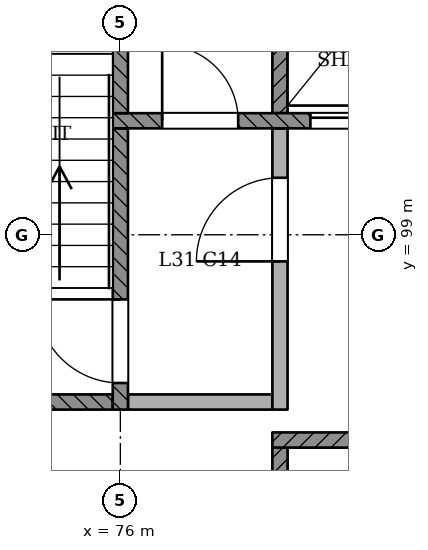
"""IFC4 building model, lengths in metres.
Left out: names, types, materials, properties, quantities, classifications, styles, units other than length and angle.
Written with IfcOpenShell. Run it as: python <this file> out.ifc"""

import sys

from ifc_helpers import new_model, si_unit, direction, frame, frame_2d, origin, place, context, subcontext, project, spatial, rectangle, extrude, element, fill, save


model = new_model("IFC4")
c1 = context("Model", 3, precision=1e-05, world=origin(), true_north=direction((0.0, 1.0)))
c2 = subcontext(c1, "Body", "Model", "MODEL_VIEW")
j1 = project(units=[si_unit("LENGTHUNIT", "METRE"), si_unit("PLANEANGLEUNIT", "RADIAN")], contexts=[c1])
p1 = place(None, origin())
s1 = spatial("IfcSite", under=j1, at=p1, CompositionType="ELEMENT")
p2 = place(p1, origin())
s2 = spatial("IfcBuilding", under=s1, at=p2, CompositionType="ELEMENT")
p3 = place(p2, frame((0.0, 0.0, 124.2)))
s3 = spatial("IfcBuildingStorey", under=s2, at=p3, CompositionType="ELEMENT", Elevation=124.2)
p4 = place(p3, frame((64.413, 98.139, 0.0), z_axis=(0.0, 0.0, 1.0), x_axis=(0.500003831119, -0.866023191876, 0.0)))
e1 = element("IfcWall", 1, at=p4, inside=s3, PredefinedType="PARTITIONING", context=c2, shape_type="SweptSolid", body=[
    extrude(rectangle(XDim=40.758, YDim=0.15, at=frame_2d((20.379, 0.0))), origin(), (0.0, 0.0, 1.0), 2.75),
])
p5 = place(p4, frame((0.2, 0.0, 0.0)))
e2 = element("IfcOpeningElement", 2, at=p5, cuts=e1, PredefinedType="OPENING", context=c2, shape_type="SweptSolid", body=[
    extrude(rectangle(XDim=1.2, YDim=2.1, at=frame_2d((0.6, 1.05))), frame((0.0, 0.085, 0.0), z_axis=(0.0, -1.0, 0.0), x_axis=(1.0, 0.0, 0.0)), (0.0, 0.0, 1.0), 0.171),
])
p6 = place(p4, frame((3.099, 0.0, 0.0)))
e3 = element("IfcOpeningElement", 3, at=p6, cuts=e1, PredefinedType="OPENING", context=c2, shape_type="SweptSolid", body=[
    extrude(rectangle(XDim=1.0, YDim=2.1, at=frame_2d((0.5, 1.05))), frame((0.0, 0.085, 0.0), z_axis=(0.0, -1.0, 0.0), x_axis=(1.0, 0.0, 0.0)), (0.0, 0.0, 1.0), 0.171),
])
p7 = place(p4, frame((9.774, 0.0, 0.0)))
e4 = element("IfcOpeningElement", 4, at=p7, cuts=e1, PredefinedType="OPENING", context=c2, shape_type="SweptSolid", body=[
    extrude(rectangle(XDim=1.0, YDim=2.1, at=frame_2d((0.5, 1.05))), frame((0.0, 0.085, 0.0), z_axis=(0.0, -1.0, 0.0), x_axis=(1.0, 0.0, 0.0)), (0.0, 0.0, 1.0), 0.171),
])
p8 = place(p4, frame((11.984, 0.0, 0.0)))
e5 = element("IfcOpeningElement", 5, at=p8, cuts=e1, PredefinedType="OPENING", context=c2, shape_type="SweptSolid", body=[
    extrude(rectangle(XDim=1.0, YDim=2.1, at=frame_2d((0.5, 1.05))), frame((0.0, 0.085, 0.0), z_axis=(0.0, -1.0, 0.0), x_axis=(1.0, 0.0, 0.0)), (0.0, 0.0, 1.0), 0.171),
])
p9 = place(p4, frame((18.659, 0.0, 0.0)))
e6 = element("IfcOpeningElement", 6, at=p9, cuts=e1, PredefinedType="OPENING", context=c2, shape_type="SweptSolid", body=[
    extrude(rectangle(XDim=1.0, YDim=2.1, at=frame_2d((0.5, 1.05))), frame((0.0, 0.085, 0.0), z_axis=(0.0, -1.0, 0.0), x_axis=(1.0, 0.0, 0.0)), (0.0, 0.0, 1.0), 0.171),
])
p10 = place(p4, frame((22.129, 0.0, 0.0)))
e7 = element("IfcOpeningElement", 7, at=p10, cuts=e1, PredefinedType="OPENING", context=c2, shape_type="SweptSolid", body=[
    extrude(rectangle(XDim=1.0, YDim=2.1, at=frame_2d((0.5, 1.05))), frame((0.0, 0.085, 0.0), z_axis=(0.0, -1.0, 0.0), x_axis=(1.0, 0.0, 0.0)), (0.0, 0.0, 1.0), 0.171),
])
p11 = place(p4, frame((27.659, 0.0, 0.0)))
e8 = element("IfcOpeningElement", 8, at=p11, cuts=e1, PredefinedType="OPENING", context=c2, shape_type="SweptSolid", body=[
    extrude(rectangle(XDim=1.0, YDim=2.1, at=frame_2d((0.5, 1.05))), frame((0.0, 0.085, 0.0), z_axis=(0.0, -1.0, 0.0), x_axis=(1.0, 0.0, 0.0)), (0.0, 0.0, 1.0), 0.171),
])
p12 = place(p4, frame((31.129, 0.0, 0.0)))
e9 = element("IfcOpeningElement", 9, at=p12, cuts=e1, PredefinedType="OPENING", context=c2, shape_type="SweptSolid", body=[
    extrude(rectangle(XDim=1.0, YDim=2.1, at=frame_2d((0.5, 1.05))), frame((0.0, 0.085, 0.0), z_axis=(0.0, -1.0, 0.0), x_axis=(1.0, 0.0, 0.0)), (0.0, 0.0, 1.0), 0.171),
])
p13 = place(p4, frame((36.659, 0.0, 0.0)))
e10 = element("IfcOpeningElement", 10, at=p13, cuts=e1, PredefinedType="OPENING", context=c2, shape_type="SweptSolid", body=[
    extrude(rectangle(XDim=1.0, YDim=2.1, at=frame_2d((0.5, 1.05))), frame((0.0, 0.085, 0.0), z_axis=(0.0, -1.0, 0.0), x_axis=(1.0, 0.0, 0.0)), (0.0, 0.0, 1.0), 0.171),
])
p14 = place(p4, frame((39.445, 0.0, 0.0)))
e11 = element("IfcOpeningElement", 11, at=p14, cuts=e1, PredefinedType="OPENING", context=c2, shape_type="SweptSolid", body=[
    extrude(rectangle(XDim=1.0, YDim=2.1, at=frame_2d((0.5, 1.05))), frame((0.0, 0.085, 0.0), z_axis=(0.0, -1.0, 0.0), x_axis=(1.0, 0.0, 0.0)), (0.0, 0.0, 1.0), 0.171),
])
p15 = place(p3, frame((78.1, 93.4, 0.0), z_axis=(0.0, 0.0, 1.0), x_axis=(0.0, 1.0, 0.0)))
e12 = element("IfcWall", 12, at=p15, inside=s3, PredefinedType="SOLIDWALL", context=c2, shape_type="SweptSolid", body=[
    extrude(rectangle(XDim=2.8, YDim=0.2, at=frame_2d((1.4, 0.0))), origin(), (0.0, 0.0, 1.0), 3.15),
])
p16 = place(p3, frame((78.0, 96.3, 0.0), z_axis=(0.0, 0.0, 1.0), x_axis=(1.0, 0.0, 0.0)))
e13 = element("IfcWall", 13, at=p16, inside=s3, PredefinedType="SOLIDWALL", context=c2, shape_type="SweptSolid", body=[
    extrude(rectangle(XDim=7.8, YDim=0.2, at=frame_2d((3.9, 0.0))), origin(), (0.0, 0.0, 1.0), 3.15),
])
p17 = place(p3, frame((73.0, 96.8, 0.0), z_axis=(0.0, 0.0, 1.0), x_axis=(1.0, 0.0, 0.0)))
e14 = element("IfcWall", 14, at=p17, inside=s3, PredefinedType="SOLIDWALL", context=c2, shape_type="SweptSolid", body=[
    extrude(rectangle(XDim=2.9, YDim=0.2, at=frame_2d((1.45, 0.0))), origin(), (0.0, 0.0, 1.0), 3.15),
])
p18 = place(p3, frame((76.0, 96.7, 0.0), z_axis=(0.0, 0.0, 1.0), x_axis=(0.0, 1.0, 0.0)))
e15 = element("IfcWall", 15, at=p18, inside=s3, PredefinedType="SOLIDWALL", context=c2, shape_type="SweptSolid", body=[
    extrude(rectangle(XDim=3.7, YDim=0.2, at=frame_2d((1.85, 0.0))), origin(), (0.0, 0.0, 1.0), 3.15),
])
p19 = place(p18, frame((0.35, 0.0, 0.0)))
e16 = element("IfcOpeningElement", 16, at=p19, cuts=e15, PredefinedType="OPENING", context=c2, shape_type="SweptSolid", body=[
    extrude(rectangle(XDim=1.1, YDim=2.1, at=frame_2d((0.55, 1.05))), frame((0.0, 0.11, 0.0), z_axis=(0.0, -1.0, 0.0), x_axis=(1.0, 0.0, 0.0)), (0.0, 0.0, 1.0), 0.221),
])
p20 = place(p3, frame((76.1, 96.8, 0.0), z_axis=(0.0, 0.0, 1.0), x_axis=(1.0, 0.0, 0.0)))
e17 = element("IfcWall", 17, at=p20, inside=s3, PredefinedType="PARTITIONING", context=c2, shape_type="SweptSolid", body=[
    extrude(rectangle(XDim=1.9, YDim=0.2, at=frame_2d((0.95, 0.0))), origin(), (0.0, 0.0, 1.0), 3.15),
])
p21 = place(p3, frame((78.1, 96.7, 0.0), z_axis=(0.0, 0.0, 1.0), x_axis=(0.0, 1.0, 0.0)))
e18 = element("IfcWall", 18, at=p21, inside=s3, PredefinedType="PARTITIONING", context=c2, shape_type="SweptSolid", body=[
    extrude(rectangle(XDim=3.7, YDim=0.2, at=frame_2d((1.85, 0.0))), origin(), (0.0, 0.0, 1.0), 3.15),
])
p22 = place(p21, frame((1.95, 0.0, 0.0)))
e19 = element("IfcOpeningElement", 19, at=p22, cuts=e18, PredefinedType="OPENING", context=c2, shape_type="SweptSolid", body=[
    extrude(rectangle(XDim=1.1, YDim=2.1, at=frame_2d((0.55, 1.05))), frame((0.0, 0.11, 0.0), z_axis=(0.0, -1.0, 0.0), x_axis=(1.0, 0.0, 0.0)), (0.0, 0.0, 1.0), 0.221),
])
p23 = place(p3, frame((75.9, 100.5, 0.0), z_axis=(0.0, 0.0, 1.0), x_axis=(1.0, 0.0, 0.0)))
e20 = element("IfcWall", 20, at=p23, inside=s3, PredefinedType="SOLIDWALL", context=c2, shape_type="SweptSolid", body=[
    extrude(rectangle(XDim=18.2, YDim=0.2, at=frame_2d((9.1, 0.0))), origin(), (0.0, 0.0, 1.0), 3.15),
])
p24 = place(p23, frame((2.6, 0.0, 0.0)))
e21 = element("IfcOpeningElement", 21, at=p24, cuts=e20, PredefinedType="OPENING", context=c2, shape_type="SweptSolid", body=[
    extrude(rectangle(XDim=1.1, YDim=2.1, at=frame_2d((0.55, 1.05))), frame((0.0, 0.11, 0.0), z_axis=(0.0, -1.0, 0.0), x_axis=(1.0, 0.0, 0.0)), (0.0, 0.0, 1.0), 0.221),
])
p25 = place(p23, frame((4.5, 0.0, 0.0)))
e22 = element("IfcOpeningElement", 22, at=p25, cuts=e20, PredefinedType="OPENING", context=c2, shape_type="SweptSolid", body=[
    extrude(rectangle(XDim=1.1, YDim=2.1, at=frame_2d((0.55, 1.05))), frame((0.0, 0.11, 0.0), z_axis=(0.0, -1.0, 0.0), x_axis=(1.0, 0.0, 0.0)), (0.0, 0.0, 1.0), 0.221),
])
p26 = place(p23, frame((6.4, 0.0, 0.0)))
e23 = element("IfcOpeningElement", 23, at=p26, cuts=e20, PredefinedType="OPENING", context=c2, shape_type="SweptSolid", body=[
    extrude(rectangle(XDim=1.1, YDim=2.1, at=frame_2d((0.55, 1.05))), frame((0.0, 0.11, 0.0), z_axis=(0.0, -1.0, 0.0), x_axis=(1.0, 0.0, 0.0)), (0.0, 0.0, 1.0), 0.221),
])
p27 = place(p23, frame((8.3, 0.0, 0.0)))
e24 = element("IfcOpeningElement", 24, at=p27, cuts=e20, PredefinedType="OPENING", context=c2, shape_type="SweptSolid", body=[
    extrude(rectangle(XDim=1.1, YDim=2.1, at=frame_2d((0.55, 1.05))), frame((0.0, 0.11, 0.0), z_axis=(0.0, -1.0, 0.0), x_axis=(1.0, 0.0, 0.0)), (0.0, 0.0, 1.0), 0.221),
])
p28 = place(p23, frame((10.2, 0.0, 0.0)))
e25 = element("IfcOpeningElement", 25, at=p28, cuts=e20, PredefinedType="OPENING", context=c2, shape_type="SweptSolid", body=[
    extrude(rectangle(XDim=1.1, YDim=2.1, at=frame_2d((0.55, 1.05))), frame((0.0, 0.11, 0.0), z_axis=(0.0, -1.0, 0.0), x_axis=(1.0, 0.0, 0.0)), (0.0, 0.0, 1.0), 0.221),
])
p29 = place(p23, frame((12.1, 0.0, 0.0)))
e26 = element("IfcOpeningElement", 26, at=p29, cuts=e20, PredefinedType="OPENING", context=c2, shape_type="SweptSolid", body=[
    extrude(rectangle(XDim=1.1, YDim=2.1, at=frame_2d((0.55, 1.05))), frame((0.0, 0.11, 0.0), z_axis=(0.0, -1.0, 0.0), x_axis=(1.0, 0.0, 0.0)), (0.0, 0.0, 1.0), 0.221),
])
p30 = place(p23, frame((14.0, 0.0, 0.0)))
e27 = element("IfcOpeningElement", 27, at=p30, cuts=e20, PredefinedType="OPENING", context=c2, shape_type="SweptSolid", body=[
    extrude(rectangle(XDim=1.1, YDim=2.1, at=frame_2d((0.55, 1.05))), frame((0.0, 0.11, 0.0), z_axis=(0.0, -1.0, 0.0), x_axis=(1.0, 0.0, 0.0)), (0.0, 0.0, 1.0), 0.221),
])
p31 = place(p23, frame((0.65, 0.0, 0.0)))
e28 = element("IfcOpeningElement", 28, at=p31, cuts=e20, PredefinedType="OPENING", context=c2, shape_type="SweptSolid", body=[
    extrude(rectangle(XDim=1.0, YDim=2.1, at=frame_2d((0.5, 1.05))), frame((0.0, 0.11, 0.0), z_axis=(0.0, -1.0, 0.0), x_axis=(1.0, 0.0, 0.0)), (0.0, 0.0, 1.0), 0.221),
])
p32 = place(p23, frame((16.3, 0.0, 0.0)))
e29 = element("IfcOpeningElement", 29, at=p32, cuts=e20, PredefinedType="OPENING", context=c2, shape_type="SweptSolid", body=[
    extrude(rectangle(XDim=1.0, YDim=2.1, at=frame_2d((0.5, 1.05))), frame((0.0, 0.11, 0.0), z_axis=(0.0, -1.0, 0.0), x_axis=(1.0, 0.0, 0.0)), (0.0, 0.0, 1.0), 0.221),
])
for number, where, z_axis, x_axis in (
    (30, (76.0, 100.6, 0.0), (0.0, 0.0, 1.0), (0.0, 1.0, 0.0)),
    (31, (78.1, 100.6, 0.0), (0.0, 0.0, 1.0), (0.0, 1.0, 0.0)),
):
    element("IfcWall", number, at=place(p3, frame(where, z_axis=z_axis, x_axis=x_axis)), inside=s3, PredefinedType="SOLIDWALL", context=c2, shape_type="SweptSolid", body=[
        extrude(rectangle(XDim=2.8, YDim=0.2, at=frame_2d((1.4, 0.0))), origin(), (0.0, 0.0, 1.0), 3.15),
    ])
p33 = place(p24, origin())
e32 = element("IfcDoor", 32, at=p33, inside=s3, OperationType="SLIDING_TO_RIGHT", PredefinedType="NOTDEFINED", context=c2, shape_type="SweptSolid", body=[
    extrude(rectangle(XDim=1.1, YDim=2.1, at=frame_2d((0.55, 1.05))), frame((0.0, 0.025, 0.0), z_axis=(0.0, -1.0, 0.0), x_axis=(1.0, 0.0, 0.0)), (0.0, 0.0, 1.0), 0.05),
])
fill(e21, e32)
p34 = place(p19, origin())
e33 = element("IfcDoor", 33, at=p34, inside=s3, OperationType="SINGLE_SWING_RIGHT", PredefinedType="NOTDEFINED", context=c2, shape_type="SweptSolid", body=[
    extrude(rectangle(XDim=1.1, YDim=2.1, at=frame_2d((0.55, 1.05))), frame((0.0, 0.025, 0.0), z_axis=(0.0, -1.0, 0.0), x_axis=(1.0, 0.0, 0.0)), (0.0, 0.0, 1.0), 0.05),
])
fill(e16, e33)
p35 = place(p22, origin())
e34 = element("IfcDoor", 34, at=p35, inside=s3, OperationType="SINGLE_SWING_LEFT", PredefinedType="NOTDEFINED", context=c2, shape_type="SweptSolid", body=[
    extrude(rectangle(XDim=1.1, YDim=2.1, at=frame_2d((0.55, 1.05))), frame((0.0, 0.025, 0.0), z_axis=(0.0, -1.0, 0.0), x_axis=(1.0, 0.0, 0.0)), (0.0, 0.0, 1.0), 0.05),
])
fill(e19, e34)
p36 = place(p31, origin())
e35 = element("IfcDoor", 35, at=p36, inside=s3, OperationType="SINGLE_SWING_LEFT", PredefinedType="NOTDEFINED", context=c2, shape_type="SweptSolid", body=[
    extrude(rectangle(XDim=1.0, YDim=2.1, at=frame_2d((0.5, 1.05))), frame((0.0, 0.025, 0.0), z_axis=(0.0, -1.0, 0.0), x_axis=(1.0, 0.0, 0.0)), (0.0, 0.0, 1.0), 0.05),
])
fill(e28, e35)
save(model, sys.argv[1])
